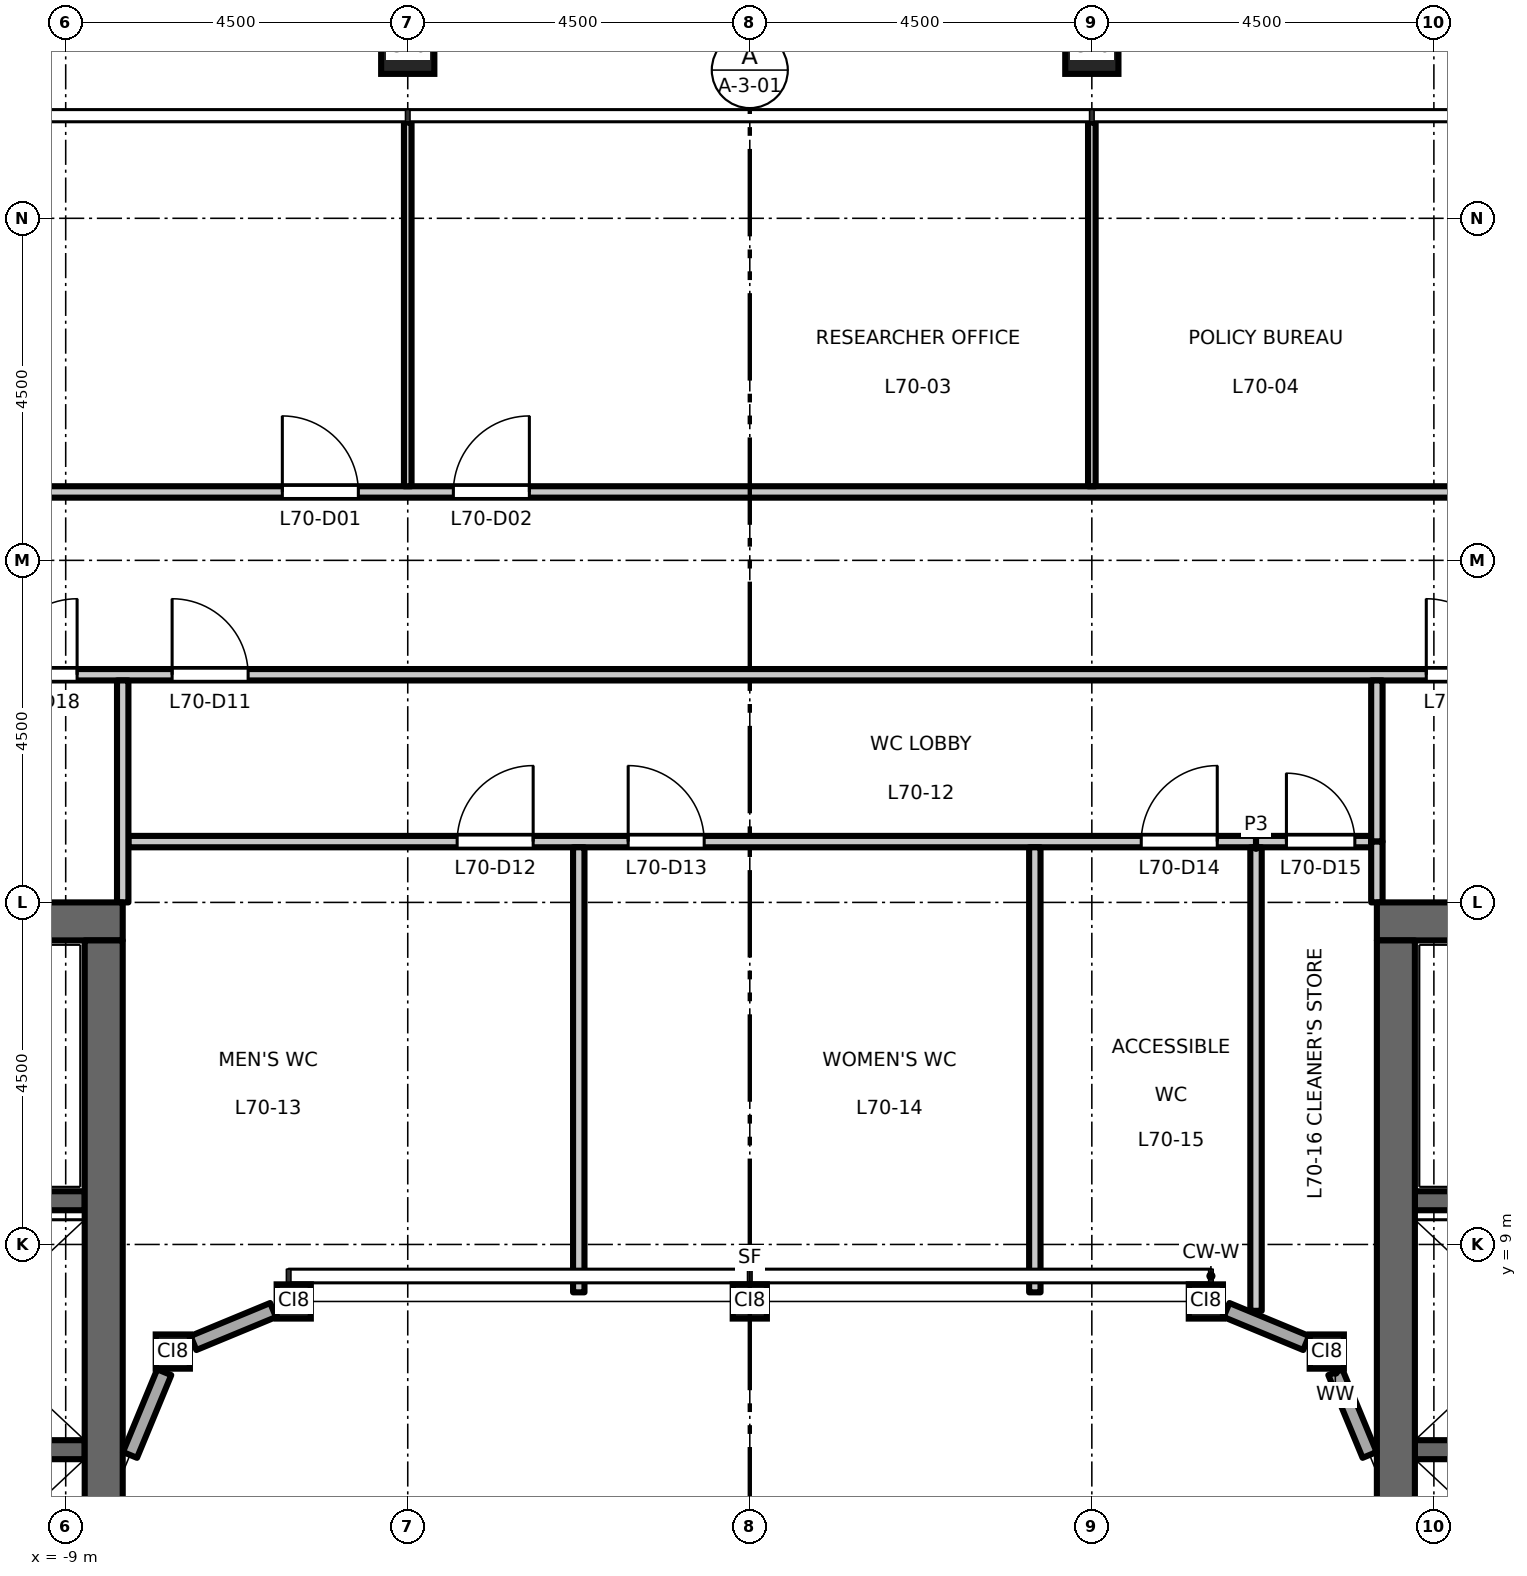
"""IFC4 building model, lengths in metres.
Left out: names, types, materials, properties, quantities, classifications, styles, units other than length and angle.
Written with IfcOpenShell. Run it as: python <this file> out.ifc"""

import sys

from ifc_helpers import new_model, si_unit, direction, frame, frame_2d, origin, origin_2d, place, context, subcontext, project, spatial, rectangle, hollow_rectangle, extrude, element, fill, save


model = new_model("IFC4")
c1 = context("Model", 3, precision=1e-05, world=origin(), true_north=direction((0.0, 1.0)))
c2 = subcontext(c1, "Body", "Model", "MODEL_VIEW")
j1 = project(units=[si_unit("LENGTHUNIT", "METRE"), si_unit("PLANEANGLEUNIT", "RADIAN")], contexts=[c1])
p1 = place(None, origin())
s1 = spatial("IfcSite", under=j1, at=p1, CompositionType="ELEMENT")
p2 = place(p1, origin())
s2 = spatial("IfcBuilding", under=s1, at=p2, CompositionType="ELEMENT")
p3 = place(p2, frame((0.0, 0.0, 325.7)))
s3 = spatial("IfcBuildingStorey", under=s2, at=p3, CompositionType="ELEMENT", Elevation=325.7)
for number, where, z_axis, x_axis in (
    (1, (4.5, 24.75, 0.0), (0.0, 0.0, 1.0), (1.0, 0.0, 0.0)),
    (2, (-4.5, 24.75, 0.0), (0.0, 0.0, 1.0), (1.0, 0.0, 0.0)),
):
    element("IfcColumn", number, at=place(p3, frame(where, z_axis=z_axis, x_axis=x_axis)), inside=s3, PredefinedType="COLUMN", context=c2, shape_type="SweptSolid", body=[
        extrude(hollow_rectangle(XDim=0.7, YDim=0.7, WallThickness=0.036, at=origin_2d()), origin(), (0.0, 0.0, 1.0), 4.5),
    ])
for number, where, z_axis, x_axis in (
    (3, (-7.591, 7.591, 0.0), (0.0, 0.0, 1.0), (1.0, 0.0, 0.0)),
    (4, (-6.0, 8.25, 0.0), (0.0, 0.0, 1.0), (1.0, 0.0, 0.0)),
    (5, (0.0, 8.25, 0.0), (0.0, 0.0, 1.0), (1.0, 0.0, 0.0)),
    (6, (6.0, 8.25, 0.0), (0.0, 0.0, 1.0), (1.0, 0.0, 0.0)),
    (7, (7.591, 7.591, 0.0), (0.0, 0.0, 1.0), (1.0, 0.0, 0.0)),
):
    element("IfcColumn", number, at=place(p3, frame(where, z_axis=z_axis, x_axis=x_axis)), inside=s3, PredefinedType="COLUMN", context=c2, shape_type="SweptSolid", body=[
        extrude(hollow_rectangle(XDim=0.45, YDim=0.45, WallThickness=0.022, at=origin_2d()), origin(), (0.0, 0.0, 1.0), 4.5),
    ])
p4 = place(p3, frame((-8.75, 6.3, 0.0), z_axis=(0.0, 0.0, 1.0), x_axis=(-1.0, 0.0, 0.0)))
e8 = element("IfcWall", 8, at=p4, inside=s3, PredefinedType="SHEAR", context=c2, shape_type="SweptSolid", body=[
    extrude(rectangle(XDim=3.1, YDim=0.25, at=frame_2d((1.55, 0.0))), origin(), (0.0, 0.0, 1.0), 4.35),
])
p5 = place(p3, frame((-8.75, 9.575, 0.0), z_axis=(0.0, 0.0, 1.0), x_axis=(-1.0, 0.0, 0.0)))
e9 = element("IfcWall", 9, at=p5, inside=s3, PredefinedType="SHEAR", context=c2, shape_type="SweptSolid", body=[
    extrude(rectangle(XDim=8.0, YDim=0.25, at=frame_2d((4.0, 0.0))), origin(), (0.0, 0.0, 1.0), 4.35),
])
p6 = place(p5, frame((6.65, 0.0, 0.0)))
e10 = element("IfcOpeningElement", 10, at=p6, cuts=e9, PredefinedType="OPENING", context=c2, shape_type="SweptSolid", body=[
    extrude(rectangle(XDim=1.1, YDim=2.1, at=frame_2d((0.55, 1.05))), frame((0.0, 0.135, 0.0), z_axis=(0.0, -1.0, 0.0), x_axis=(1.0, 0.0, 0.0)), (0.0, 0.0, 1.0), 0.27),
])
p7 = place(p3, frame((-8.25, 13.25, 0.0), z_axis=(0.0, 0.0, 1.0), x_axis=(-1.0, 0.0, 0.0)))
e11 = element("IfcWall", 11, at=p7, inside=s3, PredefinedType="SHEAR", context=c2, shape_type="SweptSolid", body=[
    extrude(rectangle(XDim=9.0, YDim=0.5, at=frame_2d((4.5, 0.0))), origin(), (0.0, 0.0, 1.0), 4.35),
])
p8 = place(p3, frame((-8.5, -13.0, 0.0), z_axis=(0.0, 0.0, 1.0), x_axis=(0.0, 1.0, 0.0)))
e12 = element("IfcWall", 12, at=p8, inside=s3, PredefinedType="SHEAR", context=c2, shape_type="SweptSolid", body=[
    extrude(rectangle(XDim=26.0, YDim=0.5, at=frame_2d((13.0, 0.0))), origin(), (0.0, 0.0, 1.0), 4.35),
])
p9 = place(p3, frame((8.75, 6.3, 0.0), z_axis=(0.0, 0.0, 1.0), x_axis=(1.0, 0.0, 0.0)))
e13 = element("IfcWall", 13, at=p9, inside=s3, PredefinedType="SHEAR", context=c2, shape_type="SweptSolid", body=[
    extrude(rectangle(XDim=3.1, YDim=0.25, at=frame_2d((1.55, 0.0))), origin(), (0.0, 0.0, 1.0), 4.35),
])
p10 = place(p3, frame((8.75, 9.575, 0.0), z_axis=(0.0, 0.0, 1.0), x_axis=(1.0, 0.0, 0.0)))
e14 = element("IfcWall", 14, at=p10, inside=s3, PredefinedType="SHEAR", context=c2, shape_type="SweptSolid", body=[
    extrude(rectangle(XDim=8.0, YDim=0.25, at=frame_2d((4.0, 0.0))), origin(), (0.0, 0.0, 1.0), 4.35),
])
p11 = place(p10, frame((6.65, 0.0, 0.0)))
e15 = element("IfcOpeningElement", 15, at=p11, cuts=e14, PredefinedType="OPENING", context=c2, shape_type="SweptSolid", body=[
    extrude(rectangle(XDim=1.1, YDim=2.1, at=frame_2d((0.55, 1.05))), frame((0.0, 0.135, 0.0), z_axis=(0.0, -1.0, 0.0), x_axis=(1.0, 0.0, 0.0)), (0.0, 0.0, 1.0), 0.27),
])
p12 = place(p3, frame((8.25, 13.25, 0.0), z_axis=(0.0, 0.0, 1.0), x_axis=(1.0, 0.0, 0.0)))
e16 = element("IfcWall", 16, at=p12, inside=s3, PredefinedType="SHEAR", context=c2, shape_type="SweptSolid", body=[
    extrude(rectangle(XDim=9.0, YDim=0.5, at=frame_2d((4.5, 0.0))), origin(), (0.0, 0.0, 1.0), 4.35),
])
p13 = place(p3, frame((8.5, -13.0, 0.0), z_axis=(0.0, 0.0, 1.0), x_axis=(0.0, 1.0, 0.0)))
e17 = element("IfcWall", 17, at=p13, inside=s3, PredefinedType="SHEAR", context=c2, shape_type="SweptSolid", body=[
    extrude(rectangle(XDim=26.0, YDim=0.5, at=frame_2d((13.0, 0.0))), origin(), (0.0, 0.0, 1.0), 4.35),
])
p14 = place(p3, frame((8.154, 6.231, 0.0), z_axis=(0.0, 0.0, 1.0), x_axis=(-0.382760542083, 0.92384758885, 0.0)))
e18 = element("IfcWall", 18, at=p14, inside=s3, PredefinedType="STANDARD", context=c2, shape_type="SweptSolid", body=[
    extrude(rectangle(XDim=1.178, YDim=0.2, at=frame_2d((0.589, 0.0))), origin(), (0.0, 0.0, 1.0), 4.01),
])
for number, where, z_axis, x_axis in (
    (19, (7.319, 7.703, 0.0), (0.0, 0.0, 1.0), (-0.924, 0.383, 0.0)),
    (20, (-6.271, 8.137, 0.0), (0.0, 0.0, 1.0), (-0.924, -0.383, 0.0)),
):
    element("IfcWall", number, at=place(p3, frame(where, z_axis=z_axis, x_axis=x_axis)), inside=s3, PredefinedType="STANDARD", context=c2, shape_type="SweptSolid", body=[
        extrude(rectangle(XDim=1.134, YDim=0.2, at=frame_2d((0.567, 0.0))), origin(), (0.0, 0.0, 1.0), 4.01),
    ])
p15 = place(p3, frame((-7.703, 7.319, 0.0), z_axis=(0.0, 0.0, 1.0), x_axis=(-0.382760542083, -0.92384758885, 0.0)))
e21 = element("IfcWall", 21, at=p15, inside=s3, PredefinedType="STANDARD", context=c2, shape_type="SweptSolid", body=[
    extrude(rectangle(XDim=1.178, YDim=0.2, at=frame_2d((0.589, 0.0))), origin(), (0.0, 0.0, 1.0), 4.01),
])
p16 = place(p3, frame((-8.175, 14.3, 0.0), z_axis=(0.0, 0.0, 1.0), x_axis=(1.0, 0.0, 0.0)))
e22 = element("IfcWall", 22, at=p16, inside=s3, PredefinedType="PARTITIONING", context=c2, shape_type="SweptSolid", body=[
    extrude(rectangle(XDim=14.835, YDim=0.15, at=frame_2d((7.417, 0.0))), origin(), (0.0, 0.0, 1.0), 4.35),
])
p17 = place(p16, frame((4.325, 0.0, 0.0)))
e23 = element("IfcOpeningElement", 23, at=p17, cuts=e22, PredefinedType="OPENING", context=c2, shape_type="SweptSolid", body=[
    extrude(rectangle(XDim=1.0, YDim=2.1, at=frame_2d((0.5, 1.05))), frame((0.0, 0.085, 0.0), z_axis=(0.0, -1.0, 0.0), x_axis=(1.0, 0.0, 0.0)), (0.0, 0.0, 1.0), 0.17),
])
p18 = place(p16, frame((6.575, 0.0, 0.0)))
e24 = element("IfcOpeningElement", 24, at=p18, cuts=e22, PredefinedType="OPENING", context=c2, shape_type="SweptSolid", body=[
    extrude(rectangle(XDim=1.0, YDim=2.1, at=frame_2d((0.5, 1.05))), frame((0.0, 0.085, 0.0), z_axis=(0.0, -1.0, 0.0), x_axis=(1.0, 0.0, 0.0)), (0.0, 0.0, 1.0), 0.17),
])
p19 = place(p16, frame((13.325, 0.0, 0.0)))
e25 = element("IfcOpeningElement", 25, at=p19, cuts=e22, PredefinedType="OPENING", context=c2, shape_type="SweptSolid", body=[
    extrude(rectangle(XDim=1.0, YDim=2.1, at=frame_2d((0.5, 1.05))), frame((0.0, 0.085, 0.0), z_axis=(0.0, -1.0, 0.0), x_axis=(1.0, 0.0, 0.0)), (0.0, 0.0, 1.0), 0.17),
])
p20 = place(p3, frame((6.66, 14.3, 0.0), z_axis=(0.0, 0.0, 1.0), x_axis=(1.0, 0.0, 0.0)))
e26 = element("IfcWall", 26, at=p20, inside=s3, PredefinedType="PARTITIONING", context=c2, shape_type="SweptSolid", body=[
    extrude(rectangle(XDim=1.515, YDim=0.15, at=frame_2d((0.758, 0.0))), origin(), (0.0, 0.0, 1.0), 4.35),
])
p21 = place(p20, frame((0.4, 0.0, 0.0)))
e27 = element("IfcOpeningElement", 27, at=p21, cuts=e26, PredefinedType="OPENING", context=c2, shape_type="SweptSolid", body=[
    extrude(rectangle(XDim=0.9, YDim=2.1, at=frame_2d((0.45, 1.05))), frame((0.0, 0.085, 0.0), z_axis=(0.0, -1.0, 0.0), x_axis=(1.0, 0.0, 0.0)), (0.0, 0.0, 1.0), 0.17),
])
p22 = place(p3, frame((-17.325, 16.495, 0.0), z_axis=(0.0, 0.0, 1.0), x_axis=(1.0, 0.0, 0.0)))
e28 = element("IfcWall", 28, at=p22, inside=s3, PredefinedType="PARTITIONING", context=c2, shape_type="SweptSolid", body=[
    extrude(rectangle(XDim=34.65, YDim=0.15, at=frame_2d((17.325, 0.0))), origin(), (0.0, 0.0, 1.0), 4.35),
])
p23 = place(p22, frame((9.725, 0.0, 0.0)))
e29 = element("IfcOpeningElement", 29, at=p23, cuts=e28, PredefinedType="OPENING", context=c2, shape_type="SweptSolid", body=[
    extrude(rectangle(XDim=1.0, YDim=2.1, at=frame_2d((0.5, 1.05))), frame((0.0, 0.085, 0.0), z_axis=(0.0, -1.0, 0.0), x_axis=(1.0, 0.0, 0.0)), (0.0, 0.0, 1.0), 0.17),
])
p24 = place(p22, frame((7.475, 0.0, 0.0)))
e30 = element("IfcOpeningElement", 30, at=p24, cuts=e28, PredefinedType="OPENING", context=c2, shape_type="SweptSolid", body=[
    extrude(rectangle(XDim=1.0, YDim=2.1, at=frame_2d((0.5, 1.05))), frame((0.0, 0.085, 0.0), z_axis=(0.0, -1.0, 0.0), x_axis=(1.0, 0.0, 0.0)), (0.0, 0.0, 1.0), 0.17),
])
p25 = place(p22, frame((26.225, 0.0, 0.0)))
e31 = element("IfcOpeningElement", 31, at=p25, cuts=e28, PredefinedType="OPENING", context=c2, shape_type="SweptSolid", body=[
    extrude(rectangle(XDim=1.0, YDim=2.1, at=frame_2d((0.5, 1.05))), frame((0.0, 0.085, 0.0), z_axis=(0.0, -1.0, 0.0), x_axis=(1.0, 0.0, 0.0)), (0.0, 0.0, 1.0), 0.17),
])
p26 = place(p3, frame((-21.441, 18.9, 0.0), z_axis=(0.0, 0.0, 1.0), x_axis=(1.0, 0.0, 0.0)))
e32 = element("IfcWall", 32, at=p26, inside=s3, PredefinedType="PARTITIONING", context=c2, shape_type="SweptSolid", body=[
    extrude(rectangle(XDim=40.944, YDim=0.15, at=frame_2d((20.472, 0.0))), origin(), (0.0, 0.0, 1.0), 4.35),
])
p27 = place(p26, frame((15.291, 0.0, 0.0)))
e33 = element("IfcOpeningElement", 33, at=p27, cuts=e32, PredefinedType="OPENING", context=c2, shape_type="SweptSolid", body=[
    extrude(rectangle(XDim=1.0, YDim=2.1, at=frame_2d((0.5, 1.05))), frame((0.0, 0.085, 0.0), z_axis=(0.0, -1.0, 0.0), x_axis=(1.0, 0.0, 0.0)), (0.0, 0.0, 1.0), 0.17),
])
p28 = place(p26, frame((17.541, 0.0, 0.0)))
e34 = element("IfcOpeningElement", 34, at=p28, cuts=e32, PredefinedType="OPENING", context=c2, shape_type="SweptSolid", body=[
    extrude(rectangle(XDim=1.0, YDim=2.1, at=frame_2d((0.5, 1.05))), frame((0.0, 0.085, 0.0), z_axis=(0.0, -1.0, 0.0), x_axis=(1.0, 0.0, 0.0)), (0.0, 0.0, 1.0), 0.17),
])
p29 = place(p26, frame((33.291, 0.0, 0.0)))
e35 = element("IfcOpeningElement", 35, at=p29, cuts=e32, PredefinedType="OPENING", context=c2, shape_type="SweptSolid", body=[
    extrude(rectangle(XDim=1.0, YDim=2.1, at=frame_2d((0.5, 1.05))), frame((0.0, 0.085, 0.0), z_axis=(0.0, -1.0, 0.0), x_axis=(1.0, 0.0, 0.0)), (0.0, 0.0, 1.0), 0.17),
])
p30 = place(p26, frame((6.291, 0.0, 0.0)))
e36 = element("IfcOpeningElement", 36, at=p30, cuts=e32, PredefinedType="OPENING", context=c2, shape_type="SweptSolid", body=[
    extrude(rectangle(XDim=1.0, YDim=2.1, at=frame_2d((0.5, 1.05))), frame((0.0, 0.085, 0.0), z_axis=(0.0, -1.0, 0.0), x_axis=(1.0, 0.0, 0.0)), (0.0, 0.0, 1.0), 0.17),
])
p31 = place(p26, frame((35.469, 0.0, 0.0)))
e37 = element("IfcOpeningElement", 37, at=p31, cuts=e32, PredefinedType="OPENING", context=c2, shape_type="SweptSolid", body=[
    extrude(rectangle(XDim=1.0, YDim=2.1, at=frame_2d((0.5, 1.05))), frame((0.0, 0.085, 0.0), z_axis=(0.0, -1.0, 0.0), x_axis=(1.0, 0.0, 0.0)), (0.0, 0.0, 1.0), 0.17),
])
p32 = place(p3, frame((-8.25, 13.5, 0.0), z_axis=(0.0, 0.0, 1.0), x_axis=(0.0, 1.0, 0.0)))
e38 = element("IfcWall", 38, at=p32, inside=s3, PredefinedType="PARTITIONING", context=c2, shape_type="SweptSolid", body=[
    extrude(rectangle(XDim=2.92, YDim=0.15, at=frame_2d((1.46, 0.0))), origin(), (0.0, 0.0, 1.0), 4.35),
])
p33 = place(p3, frame((-4.5, 18.975, 0.0), z_axis=(0.0, 0.0, 1.0), x_axis=(0.0, 1.0, 0.0)))
e39 = element("IfcWall", 39, at=p33, inside=s3, PredefinedType="PARTITIONING", context=c2, shape_type="SweptSolid", body=[
    extrude(rectangle(XDim=4.785, YDim=0.1, at=frame_2d((2.393, 0.0))), origin(), (0.0, 0.0, 1.0), 3.65),
])
for number, where, z_axis, x_axis in (
    (40, (-2.25, 8.37, 0.0), (0.0, 0.0, 1.0), (0.0, 1.0, 0.0)),
    (41, (3.75, 8.37, 0.0), (0.0, 0.0, 1.0), (0.0, 1.0, 0.0)),
):
    element("IfcWall", number, at=place(p3, frame(where, z_axis=z_axis, x_axis=x_axis)), inside=s3, PredefinedType="PARTITIONING", context=c2, shape_type="SweptSolid", body=[
        extrude(rectangle(XDim=5.855, YDim=0.15, at=frame_2d((2.927, 0.0))), origin(), (0.0, 0.0, 1.0), 4.35),
    ])
p34 = place(p3, frame((4.5, 18.975, 0.0), z_axis=(0.0, 0.0, 1.0), x_axis=(0.0, 1.0, 0.0)))
e42 = element("IfcWall", 42, at=p34, inside=s3, PredefinedType="PARTITIONING", context=c2, shape_type="SweptSolid", body=[
    extrude(rectangle(XDim=4.785, YDim=0.1, at=frame_2d((2.393, 0.0))), origin(), (0.0, 0.0, 1.0), 3.65),
])
p35 = place(p3, frame((6.66, 8.127, 0.0), z_axis=(0.0, 0.0, 1.0), x_axis=(0.0, 1.0, 0.0)))
e43 = element("IfcWall", 43, at=p35, inside=s3, PredefinedType="PARTITIONING", context=c2, shape_type="SweptSolid", body=[
    extrude(rectangle(XDim=6.098, YDim=0.15, at=frame_2d((3.049, 0.0))), origin(), (0.0, 0.0, 1.0), 4.35),
])
p36 = place(p3, frame((8.25, 14.3, 0.0), z_axis=(0.0, 0.0, 1.0), x_axis=(0.0, 1.0, 0.0)))
e44 = element("IfcWall", 44, at=p36, inside=s3, PredefinedType="PARTITIONING", context=c2, shape_type="SweptSolid", body=[
    extrude(rectangle(XDim=2.12, YDim=0.15, at=frame_2d((1.06, 0.0))), origin(), (0.0, 0.0, 1.0), 4.35),
])
p37 = place(p3, frame((8.25, 13.5, 0.0), z_axis=(0.0, 0.0, 1.0), x_axis=(0.0, 1.0, 0.0)))
e45 = element("IfcWall", 45, at=p37, inside=s3, PredefinedType="PARTITIONING", context=c2, shape_type="SweptSolid", body=[
    extrude(rectangle(XDim=0.8, YDim=0.15, at=frame_2d((0.4, 0.0))), origin(), (0.0, 0.0, 1.0), 4.35),
])
p38 = place(p27, origin())
e46 = element("IfcDoor", 46, at=p38, inside=s3, OperationType="SINGLE_SWING_LEFT", PredefinedType="DOOR", context=c2, shape_type="SweptSolid", body=[
    extrude(rectangle(XDim=1.0, YDim=2.1, at=frame_2d((0.5, 1.05))), frame((0.0, 0.025, 0.0), z_axis=(0.0, -1.0, 0.0), x_axis=(1.0, 0.0, 0.0)), (0.0, 0.0, 1.0), 0.05),
])
fill(e33, e46)
p39 = place(p28, origin())
e47 = element("IfcDoor", 47, at=p39, inside=s3, OperationType="SINGLE_SWING_RIGHT", PredefinedType="DOOR", context=c2, shape_type="SweptSolid", body=[
    extrude(rectangle(XDim=1.0, YDim=2.1, at=frame_2d((0.5, 1.05))), frame((0.0, 0.025, 0.0), z_axis=(0.0, -1.0, 0.0), x_axis=(1.0, 0.0, 0.0)), (0.0, 0.0, 1.0), 0.05),
])
fill(e34, e47)
p40 = place(p23, origin())
e48 = element("IfcDoor", 48, at=p40, inside=s3, OperationType="SINGLE_SWING_LEFT", PredefinedType="DOOR", context=c2, shape_type="SweptSolid", body=[
    extrude(rectangle(XDim=1.0, YDim=2.1, at=frame_2d((0.5, 1.05))), frame((0.0, 0.025, 0.0), z_axis=(0.0, -1.0, 0.0), x_axis=(1.0, 0.0, 0.0)), (0.0, 0.0, 1.0), 0.05),
])
fill(e29, e48)
p41 = place(p17, origin())
e49 = element("IfcDoor", 49, at=p41, inside=s3, OperationType="SINGLE_SWING_RIGHT", PredefinedType="DOOR", context=c2, shape_type="SweptSolid", body=[
    extrude(rectangle(XDim=1.0, YDim=2.1, at=frame_2d((0.5, 1.05))), frame((0.0, 0.025, 0.0), z_axis=(0.0, -1.0, 0.0), x_axis=(1.0, 0.0, 0.0)), (0.0, 0.0, 1.0), 0.05),
])
fill(e23, e49)
p42 = place(p18, origin())
e50 = element("IfcDoor", 50, at=p42, inside=s3, OperationType="SINGLE_SWING_LEFT", PredefinedType="DOOR", context=c2, shape_type="SweptSolid", body=[
    extrude(rectangle(XDim=1.0, YDim=2.1, at=frame_2d((0.5, 1.05))), frame((0.0, 0.025, 0.0), z_axis=(0.0, -1.0, 0.0), x_axis=(1.0, 0.0, 0.0)), (0.0, 0.0, 1.0), 0.05),
])
fill(e24, e50)
p43 = place(p19, origin())
e51 = element("IfcDoor", 51, at=p43, inside=s3, OperationType="SINGLE_SWING_RIGHT", PredefinedType="DOOR", context=c2, shape_type="SweptSolid", body=[
    extrude(rectangle(XDim=1.0, YDim=2.1, at=frame_2d((0.5, 1.05))), frame((0.0, 0.025, 0.0), z_axis=(0.0, -1.0, 0.0), x_axis=(1.0, 0.0, 0.0)), (0.0, 0.0, 1.0), 0.05),
])
fill(e25, e51)
p44 = place(p21, origin())
e52 = element("IfcDoor", 52, at=p44, inside=s3, OperationType="SINGLE_SWING_LEFT", PredefinedType="DOOR", context=c2, shape_type="SweptSolid", body=[
    extrude(rectangle(XDim=0.9, YDim=2.1, at=frame_2d((0.45, 1.05))), frame((0.0, 0.025, 0.0), z_axis=(0.0, -1.0, 0.0), x_axis=(1.0, 0.0, 0.0)), (0.0, 0.0, 1.0), 0.05),
])
fill(e27, e52)
p45 = place(p24, origin())
e53 = element("IfcDoor", 53, at=p45, inside=s3, OperationType="SINGLE_SWING_RIGHT", PredefinedType="DOOR", context=c2, shape_type="SweptSolid", body=[
    extrude(rectangle(XDim=1.0, YDim=2.1, at=frame_2d((0.5, 1.05))), frame((0.0, 0.025, 0.0), z_axis=(0.0, -1.0, 0.0), x_axis=(1.0, 0.0, 0.0)), (0.0, 0.0, 1.0), 0.05),
])
fill(e30, e53)
p46 = place(p25, origin())
e54 = element("IfcDoor", 54, at=p46, inside=s3, OperationType="SINGLE_SWING_LEFT", PredefinedType="DOOR", context=c2, shape_type="SweptSolid", body=[
    extrude(rectangle(XDim=1.0, YDim=2.1, at=frame_2d((0.5, 1.05))), frame((0.0, 0.025, 0.0), z_axis=(0.0, -1.0, 0.0), x_axis=(1.0, 0.0, 0.0)), (0.0, 0.0, 1.0), 0.05),
])
fill(e31, e54)
save(model, sys.argv[1])
